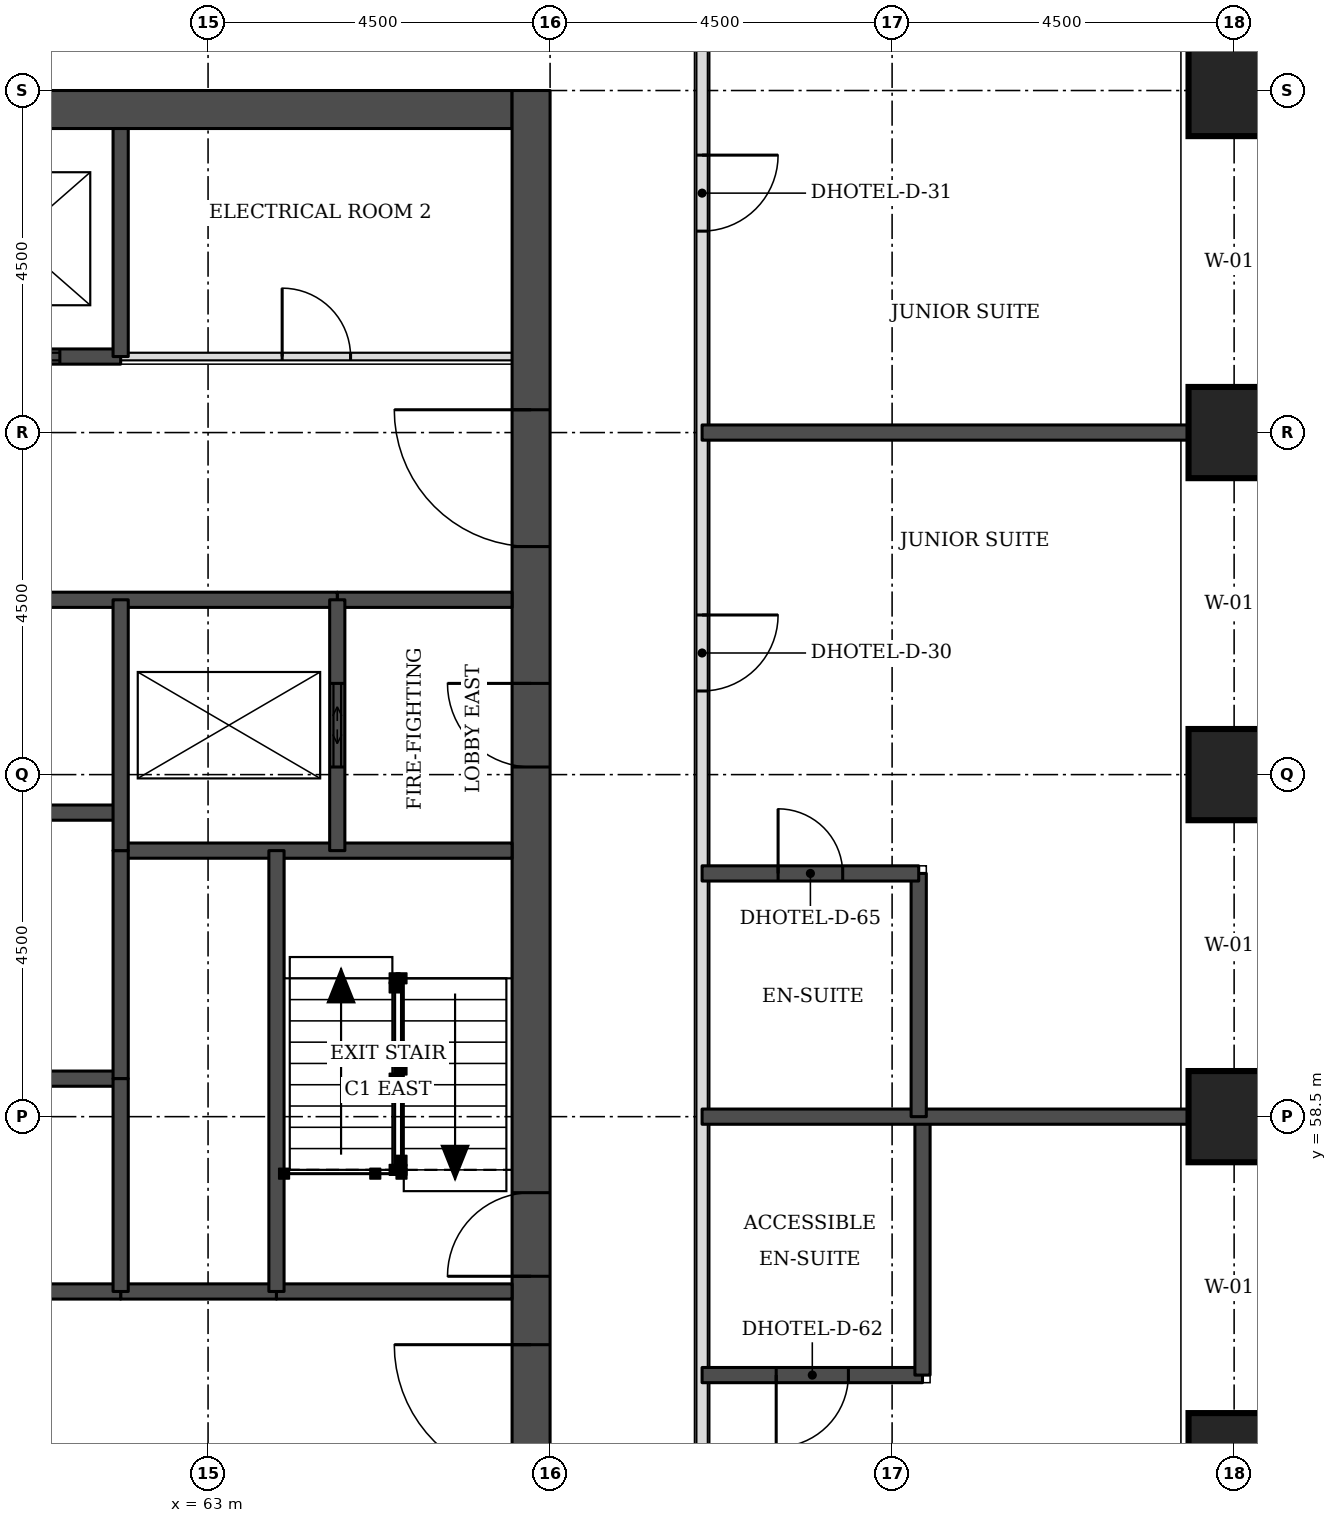
"""IFC4 building model, lengths in metres.
Left out: names, types, materials, properties, quantities, classifications, styles, units other than length and angle.
Written with IfcOpenShell. Run it as: python <this file> out.ifc"""

import sys

from ifc_helpers import new_model, si_unit, direction, frame, frame_2d, origin, origin_2d, place, context, subcontext, project, spatial, rectangle, extrude, element, fill, save


model = new_model("IFC4")
c1 = context("Model", 3, precision=1e-05, world=origin(), true_north=direction((0.0, 1.0)))
c2 = subcontext(c1, "Body", "Model", "MODEL_VIEW")
j1 = project(units=[si_unit("LENGTHUNIT", "METRE"), si_unit("PLANEANGLEUNIT", "RADIAN")], contexts=[c1])
p1 = place(None, origin())
s1 = spatial("IfcSite", under=j1, at=p1, CompositionType="ELEMENT")
p2 = place(p1, origin())
s2 = spatial("IfcBuilding", under=s1, at=p2, CompositionType="ELEMENT")
p3 = place(p2, frame((0.0, 0.0, 59.4)))
s3 = spatial("IfcBuildingStorey", under=s2, at=p3, CompositionType="ELEMENT", Elevation=59.4)
for number, where, z_axis, x_axis in (
    (1, (76.5, 54.0, 0.0), (0.0, 0.0, 1.0), (1.0, 0.0, 0.0)),
    (2, (76.5, 58.5, 0.0), (0.0, 0.0, 1.0), (1.0, 0.0, 0.0)),
    (3, (76.5, 63.0, 0.0), (0.0, 0.0, 1.0), (1.0, 0.0, 0.0)),
    (4, (76.5, 67.5, 0.0), (0.0, 0.0, 1.0), (1.0, 0.0, 0.0)),
    (5, (76.5, 72.0, 0.0), (0.0, 0.0, 1.0), (1.0, 0.0, 0.0)),
):
    element("IfcColumn", number, at=place(p3, frame(where, z_axis=z_axis, x_axis=x_axis)), inside=s3, PredefinedType="COLUMN", context=c2, shape_type="SweptSolid", body=[
        extrude(rectangle(XDim=1.2, YDim=1.2, at=origin_2d()), origin(), (0.0, 0.0, 1.0), 3.3),
    ])
p4 = place(p3, frame((45.5, 71.75, 0.0), z_axis=(0.0, 0.0, 1.0), x_axis=(1.0, 0.0, 0.0)))
e6 = element("IfcWall", 6, at=p4, inside=s3, PredefinedType="SHEAR", context=c2, shape_type="SweptSolid", body=[
    extrude(rectangle(XDim=21.5, YDim=0.5, at=frame_2d((10.75, 0.0))), origin(), (0.0, 0.0, 1.0), 3.3),
])
p5 = place(p3, frame((67.25, 49.5, 0.0), z_axis=(0.0, 0.0, 1.0), x_axis=(0.0, 1.0, 0.0)))
e7 = element("IfcWall", 7, at=p5, inside=s3, PredefinedType="SHEAR", context=c2, shape_type="SweptSolid", body=[
    extrude(rectangle(XDim=22.5, YDim=0.5, at=frame_2d((11.25, 0.0))), origin(), (0.0, 0.0, 1.0), 3.3),
])
p6 = place(p5, frame((4.2, 0.0, 0.0)))
e8 = element("IfcOpeningElement", 8, at=p6, cuts=e7, PredefinedType="OPENING", context=c2, shape_type="SweptSolid", body=[
    extrude(rectangle(XDim=1.8, YDim=2.1, at=frame_2d((0.9, 1.05))), frame((0.0, 0.26, 0.0), z_axis=(0.0, -1.0, 0.0), x_axis=(1.0, 0.0, 0.0)), (0.0, 0.0, 1.0), 0.52),
])
p7 = place(p5, frame((6.9, 0.0, 0.0)))
e9 = element("IfcOpeningElement", 9, at=p7, cuts=e7, PredefinedType="OPENING", context=c2, shape_type="SweptSolid", body=[
    extrude(rectangle(XDim=1.1, YDim=2.1, at=frame_2d((0.55, 1.05))), frame((0.0, 0.26, 0.0), z_axis=(0.0, -1.0, 0.0), x_axis=(1.0, 0.0, 0.0)), (0.0, 0.0, 1.0), 0.52),
])
p8 = place(p5, frame((13.6, 0.0, 0.0)))
e10 = element("IfcOpeningElement", 10, at=p8, cuts=e7, PredefinedType="OPENING", context=c2, shape_type="SweptSolid", body=[
    extrude(rectangle(XDim=1.1, YDim=2.1, at=frame_2d((0.55, 1.05))), frame((0.0, 0.26, 0.0), z_axis=(0.0, -1.0, 0.0), x_axis=(1.0, 0.0, 0.0)), (0.0, 0.0, 1.0), 0.52),
])
p9 = place(p5, frame((16.5, 0.0, 0.0)))
e11 = element("IfcOpeningElement", 11, at=p9, cuts=e7, PredefinedType="OPENING", context=c2, shape_type="SweptSolid", body=[
    extrude(rectangle(XDim=1.8, YDim=2.1, at=frame_2d((0.9, 1.05))), frame((0.0, 0.26, 0.0), z_axis=(0.0, -1.0, 0.0), x_axis=(1.0, 0.0, 0.0)), (0.0, 0.0, 1.0), 0.52),
])
p10 = place(p3, frame((69.5, 47.5, 0.0), z_axis=(0.0, 0.0, 1.0), x_axis=(0.0, 1.0, 0.0)))
e12 = element("IfcWall", 12, at=p10, inside=s3, PredefinedType="PARTITIONING", context=c2, shape_type="SweptSolid", body=[
    extrude(rectangle(XDim=26.5, YDim=0.15, at=frame_2d((13.25, 0.0))), origin(), (0.0, 0.0, 1.0), 3.08),
])
p11 = place(p10, frame((22.65, 0.0, 0.0)))
e13 = element("IfcOpeningElement", 13, at=p11, cuts=e12, PredefinedType="OPENING", context=c2, shape_type="SweptSolid", body=[
    extrude(rectangle(XDim=1.0, YDim=2.1, at=frame_2d((0.5, 1.05))), frame((0.0, 0.085, 0.0), z_axis=(0.0, -1.0, 0.0), x_axis=(1.0, 0.0, 0.0)), (0.0, 0.0, 1.0), 0.17),
])
p12 = place(p10, frame((16.6, 0.0, 0.0)))
e14 = element("IfcOpeningElement", 14, at=p12, cuts=e12, PredefinedType="OPENING", context=c2, shape_type="SweptSolid", body=[
    extrude(rectangle(XDim=1.0, YDim=2.1, at=frame_2d((0.5, 1.05))), frame((0.0, 0.085, 0.0), z_axis=(0.0, -1.0, 0.0), x_axis=(1.0, 0.0, 0.0)), (0.0, 0.0, 1.0), 0.17),
])
p13 = place(p10, frame((4.25, 0.0, 0.0)))
e15 = element("IfcOpeningElement", 15, at=p13, cuts=e12, PredefinedType="OPENING", context=c2, shape_type="SweptSolid", body=[
    extrude(rectangle(XDim=1.1, YDim=2.1, at=frame_2d((0.55, 1.05))), frame((0.0, 0.085, 0.0), z_axis=(0.0, -1.0, 0.0), x_axis=(1.0, 0.0, 0.0)), (0.0, 0.0, 1.0), 0.17),
])
p14 = place(p10, frame((0.55, 0.0, 0.0)))
e16 = element("IfcOpeningElement", 16, at=p14, cuts=e12, PredefinedType="OPENING", context=c2, shape_type="SweptSolid", body=[
    extrude(rectangle(XDim=1.0, YDim=2.1, at=frame_2d((0.5, 1.05))), frame((0.0, 0.085, 0.0), z_axis=(0.0, -1.0, 0.0), x_axis=(1.0, 0.0, 0.0)), (0.0, 0.0, 1.0), 0.17),
])
p15 = place(p3, frame((69.5, 55.1, 0.0), z_axis=(0.0, 0.0, 1.0), x_axis=(1.0, 0.0, 0.0)))
e17 = element("IfcWall", 17, at=p15, inside=s3, PredefinedType="SOLIDWALL", context=c2, shape_type="SweptSolid", body=[
    extrude(rectangle(XDim=2.9, YDim=0.2, at=frame_2d((1.45, 0.0))), origin(), (0.0, 0.0, 1.0), 3.08),
])
p16 = place(p15, frame((0.975, 0.0, 0.0)))
e18 = element("IfcOpeningElement", 18, at=p16, cuts=e17, PredefinedType="OPENING", context=c2, shape_type="SweptSolid", body=[
    extrude(rectangle(XDim=0.95, YDim=2.1, at=frame_2d((0.475, 1.05))), frame((0.0, 0.11, 0.0), z_axis=(0.0, -1.0, 0.0), x_axis=(1.0, 0.0, 0.0)), (0.0, 0.0, 1.0), 0.22),
])
p17 = place(p3, frame((72.4, 55.1, 0.0), z_axis=(0.0, 0.0, 1.0), x_axis=(0.0, 1.0, 0.0)))
e19 = element("IfcWall", 19, at=p17, inside=s3, PredefinedType="SOLIDWALL", context=c2, shape_type="SweptSolid", body=[
    extrude(rectangle(XDim=3.4, YDim=0.2, at=frame_2d((1.7, 0.0))), origin(), (0.0, 0.0, 1.0), 3.08),
])
p18 = place(p3, frame((69.5, 58.5, 0.0), z_axis=(0.0, 0.0, 1.0), x_axis=(1.0, 0.0, 0.0)))
e20 = element("IfcWall", 20, at=p18, inside=s3, PredefinedType="SOLIDWALL", context=c2, shape_type="SweptSolid", body=[
    extrude(rectangle(XDim=6.4, YDim=0.2, at=frame_2d((3.2, 0.0))), origin(), (0.0, 0.0, 1.0), 3.08),
])
p19 = place(p3, frame((72.35, 58.5, 0.0), z_axis=(0.0, 0.0, 1.0), x_axis=(0.0, 1.0, 0.0)))
e21 = element("IfcWall", 21, at=p19, inside=s3, PredefinedType="SOLIDWALL", context=c2, shape_type="SweptSolid", body=[
    extrude(rectangle(XDim=3.2, YDim=0.2, at=frame_2d((1.6, 0.0))), origin(), (0.0, 0.0, 1.0), 3.08),
])
p20 = place(p3, frame((69.5, 61.7, 0.0), z_axis=(0.0, 0.0, 1.0), x_axis=(1.0, 0.0, 0.0)))
e22 = element("IfcWall", 22, at=p20, inside=s3, PredefinedType="SOLIDWALL", context=c2, shape_type="SweptSolid", body=[
    extrude(rectangle(XDim=2.85, YDim=0.2, at=frame_2d((1.425, 0.0))), origin(), (0.0, 0.0, 1.0), 3.08),
])
p21 = place(p20, frame((1.0, 0.0, 0.0)))
e23 = element("IfcOpeningElement", 23, at=p21, cuts=e22, PredefinedType="OPENING", context=c2, shape_type="SweptSolid", body=[
    extrude(rectangle(XDim=0.85, YDim=2.1, at=frame_2d((0.425, 1.05))), frame((0.0, 0.11, 0.0), z_axis=(0.0, -1.0, 0.0), x_axis=(1.0, 0.0, 0.0)), (0.0, 0.0, 1.0), 0.22),
])
p22 = place(p3, frame((69.5, 67.5, 0.0), z_axis=(0.0, 0.0, 1.0), x_axis=(1.0, 0.0, 0.0)))
e24 = element("IfcWall", 24, at=p22, inside=s3, PredefinedType="SOLIDWALL", context=c2, shape_type="SweptSolid", body=[
    extrude(rectangle(XDim=6.4, YDim=0.2, at=frame_2d((3.2, 0.0))), origin(), (0.0, 0.0, 1.0), 3.08),
])
p23 = place(p3, frame((61.85, 56.2, 0.0), z_axis=(0.0, 0.0, 1.0), x_axis=(1.0, 0.0, 0.0)))
e25 = element("IfcWall", 25, at=p23, inside=s3, PredefinedType="SOLIDWALL", context=c2, shape_type="SweptSolid", body=[
    extrude(rectangle(XDim=2.05, YDim=0.2, at=frame_2d((1.025, 0.0))), origin(), (0.0, 0.0, 1.0), 3.08),
])
p24 = place(p3, frame((50.65, 56.2, 0.0), z_axis=(0.0, 0.0, 1.0), x_axis=(1.0, 0.0, 0.0)))
e26 = element("IfcWall", 26, at=p24, inside=s3, PredefinedType="SOLIDWALL", context=c2, shape_type="SweptSolid", body=[
    extrude(rectangle(XDim=11.2, YDim=0.2, at=frame_2d((5.6, 0.0))), origin(), (0.0, 0.0, 1.0), 3.08),
])
p25 = place(p3, frame((63.9, 56.2, 0.0), z_axis=(0.0, 0.0, 1.0), x_axis=(1.0, 0.0, 0.0)))
e27 = element("IfcWall", 27, at=p25, inside=s3, PredefinedType="SOLIDWALL", context=c2, shape_type="SweptSolid", body=[
    extrude(rectangle(XDim=3.1, YDim=0.2, at=frame_2d((1.55, 0.0))), origin(), (0.0, 0.0, 1.0), 3.08),
])
p26 = place(p3, frame((50.65, 59.0, 0.0), z_axis=(0.0, 0.0, 1.0), x_axis=(1.0, 0.0, 0.0)))
e28 = element("IfcWall", 28, at=p26, inside=s3, PredefinedType="SOLIDWALL", context=c2, shape_type="SweptSolid", body=[
    extrude(rectangle(XDim=11.2, YDim=0.2, at=frame_2d((5.6, 0.0))), origin(), (0.0, 0.0, 1.0), 3.3),
])
p27 = place(p3, frame((61.85, 62.0, 0.0), z_axis=(0.0, 0.0, 1.0), x_axis=(1.0, 0.0, 0.0)))
e29 = element("IfcWall", 29, at=p27, inside=s3, PredefinedType="SOLIDWALL", context=c2, shape_type="SweptSolid", body=[
    extrude(rectangle(XDim=5.15, YDim=0.2, at=frame_2d((2.575, 0.0))), origin(), (0.0, 0.0, 1.0), 3.08),
])
p28 = place(p3, frame((50.65, 62.5, 0.0), z_axis=(0.0, 0.0, 1.0), x_axis=(1.0, 0.0, 0.0)))
e30 = element("IfcWall", 30, at=p28, inside=s3, PredefinedType="SOLIDWALL", context=c2, shape_type="SweptSolid", body=[
    extrude(rectangle(XDim=11.2, YDim=0.2, at=frame_2d((5.6, 0.0))), origin(), (0.0, 0.0, 1.0), 3.3),
])
p29 = place(p3, frame((64.7, 65.3, 0.0), z_axis=(0.0, 0.0, 1.0), x_axis=(1.0, 0.0, 0.0)))
e31 = element("IfcWall", 31, at=p29, inside=s3, PredefinedType="SOLIDWALL", context=c2, shape_type="SweptSolid", body=[
    extrude(rectangle(XDim=2.3, YDim=0.2, at=frame_2d((1.15, 0.0))), origin(), (0.0, 0.0, 1.0), 3.08),
])
p30 = place(p3, frame((47.8, 65.3, 0.0), z_axis=(0.0, 0.0, 1.0), x_axis=(1.0, 0.0, 0.0)))
e32 = element("IfcWall", 32, at=p30, inside=s3, PredefinedType="SOLIDWALL", context=c2, shape_type="SweptSolid", body=[
    extrude(rectangle(XDim=16.9, YDim=0.2, at=frame_2d((8.45, 0.0))), origin(), (0.0, 0.0, 1.0), 3.08),
])
p31 = place(p3, frame((61.85, 68.5, 0.0), z_axis=(0.0, 0.0, 1.0), x_axis=(1.0, 0.0, 0.0)))
e33 = element("IfcWall", 33, at=p31, inside=s3, PredefinedType="PARTITIONING", context=c2, shape_type="SweptSolid", body=[
    extrude(rectangle(XDim=5.15, YDim=0.1, at=frame_2d((2.575, 0.0))), origin(), (0.0, 0.0, 1.0), 3.08),
])
p32 = place(p31, frame((2.125, 0.0, 0.0)))
e34 = element("IfcOpeningElement", 34, at=p32, cuts=e33, PredefinedType="OPENING", context=c2, shape_type="SweptSolid", body=[
    extrude(rectangle(XDim=0.9, YDim=2.1, at=frame_2d((0.45, 1.05))), frame((0.0, 0.06, 0.0), z_axis=(0.0, -1.0, 0.0), x_axis=(1.0, 0.0, 0.0)), (0.0, 0.0, 1.0), 0.12),
])
p33 = place(p3, frame((50.65, 68.5, 0.0), z_axis=(0.0, 0.0, 1.0), x_axis=(1.0, 0.0, 0.0)))
e35 = element("IfcWall", 35, at=p33, inside=s3, PredefinedType="SOLIDWALL", context=c2, shape_type="SweptSolid", body=[
    extrude(rectangle(XDim=11.2, YDim=0.2, at=frame_2d((5.6, 0.0))), origin(), (0.0, 0.0, 1.0), 3.08),
])
p34 = place(p33, frame((0.8, 0.0, 0.0)))
e36 = element("IfcOpeningElement", 36, at=p34, cuts=e35, PredefinedType="OPENING", context=c2, shape_type="SweptSolid", body=[
    extrude(rectangle(XDim=1.2, YDim=2.1, at=frame_2d((0.6, 1.05))), frame((0.0, 0.11, 0.0), z_axis=(0.0, -1.0, 0.0), x_axis=(1.0, 0.0, 0.0)), (0.0, 0.0, 1.0), 0.22),
])
p35 = place(p33, frame((3.6, 0.0, 0.0)))
e37 = element("IfcOpeningElement", 37, at=p35, cuts=e35, PredefinedType="OPENING", context=c2, shape_type="SweptSolid", body=[
    extrude(rectangle(XDim=1.2, YDim=2.1, at=frame_2d((0.6, 1.05))), frame((0.0, 0.11, 0.0), z_axis=(0.0, -1.0, 0.0), x_axis=(1.0, 0.0, 0.0)), (0.0, 0.0, 1.0), 0.22),
])
p36 = place(p33, frame((6.4, 0.0, 0.0)))
e38 = element("IfcOpeningElement", 38, at=p36, cuts=e35, PredefinedType="OPENING", context=c2, shape_type="SweptSolid", body=[
    extrude(rectangle(XDim=1.2, YDim=2.1, at=frame_2d((0.6, 1.05))), frame((0.0, 0.11, 0.0), z_axis=(0.0, -1.0, 0.0), x_axis=(1.0, 0.0, 0.0)), (0.0, 0.0, 1.0), 0.22),
])
p37 = place(p33, frame((9.2, 0.0, 0.0)))
e39 = element("IfcOpeningElement", 39, at=p37, cuts=e35, PredefinedType="OPENING", context=c2, shape_type="SweptSolid", body=[
    extrude(rectangle(XDim=1.2, YDim=2.1, at=frame_2d((0.6, 1.05))), frame((0.0, 0.11, 0.0), z_axis=(0.0, -1.0, 0.0), x_axis=(1.0, 0.0, 0.0)), (0.0, 0.0, 1.0), 0.22),
])
p38 = place(p3, frame((61.85, 59.0, 0.0), z_axis=(0.0, 0.0, 1.0), x_axis=(0.0, 1.0, 0.0)))
e40 = element("IfcWall", 40, at=p38, inside=s3, PredefinedType="SOLIDWALL", context=c2, shape_type="SweptSolid", body=[
    extrude(rectangle(XDim=3.0, YDim=0.2, at=frame_2d((1.5, 0.0))), origin(), (0.0, 0.0, 1.0), 3.3),
])
p39 = place(p3, frame((61.85, 56.2, 0.0), z_axis=(0.0, 0.0, 1.0), x_axis=(0.0, 1.0, 0.0)))
e41 = element("IfcWall", 41, at=p39, inside=s3, PredefinedType="SOLIDWALL", context=c2, shape_type="SweptSolid", body=[
    extrude(rectangle(XDim=2.8, YDim=0.2, at=frame_2d((1.4, 0.0))), origin(), (0.0, 0.0, 1.0), 3.08),
])
p40 = place(p3, frame((61.85, 62.0, 0.0), z_axis=(0.0, 0.0, 1.0), x_axis=(0.0, 1.0, 0.0)))
e42 = element("IfcWall", 42, at=p40, inside=s3, PredefinedType="SOLIDWALL", context=c2, shape_type="SweptSolid", body=[
    extrude(rectangle(XDim=3.3, YDim=0.2, at=frame_2d((1.65, 0.0))), origin(), (0.0, 0.0, 1.0), 3.08),
])
p41 = place(p3, frame((61.85, 68.5, 0.0), z_axis=(0.0, 0.0, 1.0), x_axis=(0.0, 1.0, 0.0)))
e43 = element("IfcWall", 43, at=p41, inside=s3, PredefinedType="SOLIDWALL", context=c2, shape_type="SweptSolid", body=[
    extrude(rectangle(XDim=3.0, YDim=0.2, at=frame_2d((1.5, 0.0))), origin(), (0.0, 0.0, 1.0), 3.08),
])
p42 = place(p3, frame((63.9, 56.2, 0.0), z_axis=(0.0, 0.0, 1.0), x_axis=(0.0, 1.0, 0.0)))
e44 = element("IfcWall", 44, at=p42, inside=s3, PredefinedType="SOLIDWALL", context=c2, shape_type="SweptSolid", body=[
    extrude(rectangle(XDim=5.8, YDim=0.2, at=frame_2d((2.9, 0.0))), origin(), (0.0, 0.0, 1.0), 3.08),
])
p43 = place(p3, frame((64.7, 62.0, 0.0), z_axis=(0.0, 0.0, 1.0), x_axis=(0.0, 1.0, 0.0)))
e45 = element("IfcWall", 45, at=p43, inside=s3, PredefinedType="SOLIDWALL", context=c2, shape_type="SweptSolid", body=[
    extrude(rectangle(XDim=3.3, YDim=0.2, at=frame_2d((1.65, 0.0))), origin(), (0.0, 0.0, 1.0), 3.08),
])
p44 = place(p43, frame((1.1, 0.0, 0.0)))
e46 = element("IfcOpeningElement", 46, at=p44, cuts=e45, PredefinedType="OPENING", context=c2, shape_type="SweptSolid", body=[
    extrude(rectangle(XDim=1.1, YDim=2.1, at=frame_2d((0.55, 1.05))), frame((0.0, 0.11, 0.0), z_axis=(0.0, -1.0, 0.0), x_axis=(1.0, 0.0, 0.0)), (0.0, 0.0, 1.0), 0.22),
])
p45 = place(p11, frame((1.0, 0.0, 0.0), z_axis=(0.0, 0.0, 1.0), x_axis=(-1.0, 0.0, 0.0)))
e47 = element("IfcDoor", 47, at=p45, inside=s3, OperationType="SINGLE_SWING_LEFT", PredefinedType="DOOR", context=c2, shape_type="SweptSolid", body=[
    extrude(rectangle(XDim=1.0, YDim=2.1, at=frame_2d((0.5, 1.05))), frame((0.0, 0.025, 0.0), z_axis=(0.0, -1.0, 0.0), x_axis=(1.0, 0.0, 0.0)), (0.0, 0.0, 1.0), 0.05),
])
fill(e13, e47)
p46 = place(p12, frame((1.0, 0.0, 0.0), z_axis=(0.0, 0.0, 1.0), x_axis=(-1.0, 0.0, 0.0)))
e48 = element("IfcDoor", 48, at=p46, inside=s3, OperationType="SINGLE_SWING_LEFT", PredefinedType="DOOR", context=c2, shape_type="SweptSolid", body=[
    extrude(rectangle(XDim=1.0, YDim=2.1, at=frame_2d((0.5, 1.05))), frame((0.0, 0.025, 0.0), z_axis=(0.0, -1.0, 0.0), x_axis=(1.0, 0.0, 0.0)), (0.0, 0.0, 1.0), 0.05),
])
fill(e14, e48)
p47 = place(p21, origin())
e49 = element("IfcDoor", 49, at=p47, inside=s3, OperationType="SINGLE_SWING_LEFT", PredefinedType="DOOR", context=c2, shape_type="SweptSolid", body=[
    extrude(rectangle(XDim=0.85, YDim=2.1, at=frame_2d((0.425, 1.05))), frame((0.0, 0.025, 0.0), z_axis=(0.0, -1.0, 0.0), x_axis=(1.0, 0.0, 0.0)), (0.0, 0.0, 1.0), 0.05),
])
fill(e23, e49)
p48 = place(p16, frame((0.95, 0.0, 0.0), z_axis=(0.0, 0.0, 1.0), x_axis=(-1.0, 0.0, 0.0)))
e50 = element("IfcDoor", 50, at=p48, inside=s3, OperationType="SINGLE_SWING_RIGHT", PredefinedType="DOOR", context=c2, shape_type="SweptSolid", body=[
    extrude(rectangle(XDim=0.95, YDim=2.1, at=frame_2d((0.475, 1.05))), frame((0.0, 0.025, 0.0), z_axis=(0.0, -1.0, 0.0), x_axis=(1.0, 0.0, 0.0)), (0.0, 0.0, 1.0), 0.05),
])
fill(e18, e50)
p49 = place(p37, origin())
e51 = element("IfcDoor", 51, at=p49, inside=s3, OperationType="DOUBLE_DOOR_SLIDING", PredefinedType="DOOR", context=c2, shape_type="SweptSolid", body=[
    extrude(rectangle(XDim=1.2, YDim=2.1, at=frame_2d((0.6, 1.05))), frame((0.0, 0.025, 0.0), z_axis=(0.0, -1.0, 0.0), x_axis=(1.0, 0.0, 0.0)), (0.0, 0.0, 1.0), 0.05),
])
fill(e39, e51)
p50 = place(p44, origin())
e52 = element("IfcDoor", 52, at=p50, inside=s3, OperationType="DOUBLE_DOOR_SLIDING", PredefinedType="DOOR", context=c2, shape_type="SweptSolid", body=[
    extrude(rectangle(XDim=1.1, YDim=2.1, at=frame_2d((0.55, 1.05))), frame((0.0, 0.025, 0.0), z_axis=(0.0, -1.0, 0.0), x_axis=(1.0, 0.0, 0.0)), (0.0, 0.0, 1.0), 0.05),
])
fill(e46, e52)
p51 = place(p6, origin())
e53 = element("IfcDoor", 53, at=p51, inside=s3, OperationType="SINGLE_SWING_RIGHT", PredefinedType="DOOR", context=c2, shape_type="SweptSolid", body=[
    extrude(rectangle(XDim=1.8, YDim=2.1, at=frame_2d((0.9, 1.05))), frame((0.0, 0.025, 0.0), z_axis=(0.0, -1.0, 0.0), x_axis=(1.0, 0.0, 0.0)), (0.0, 0.0, 1.0), 0.05),
])
fill(e8, e53)
p52 = place(p7, origin())
e54 = element("IfcDoor", 54, at=p52, inside=s3, OperationType="SINGLE_SWING_LEFT", PredefinedType="DOOR", context=c2, shape_type="SweptSolid", body=[
    extrude(rectangle(XDim=1.1, YDim=2.1, at=frame_2d((0.55, 1.05))), frame((0.0, 0.025, 0.0), z_axis=(0.0, -1.0, 0.0), x_axis=(1.0, 0.0, 0.0)), (0.0, 0.0, 1.0), 0.05),
])
fill(e9, e54)
p53 = place(p8, origin())
e55 = element("IfcDoor", 55, at=p53, inside=s3, OperationType="SINGLE_SWING_RIGHT", PredefinedType="DOOR", context=c2, shape_type="SweptSolid", body=[
    extrude(rectangle(XDim=1.1, YDim=2.1, at=frame_2d((0.55, 1.05))), frame((0.0, 0.025, 0.0), z_axis=(0.0, -1.0, 0.0), x_axis=(1.0, 0.0, 0.0)), (0.0, 0.0, 1.0), 0.05),
])
fill(e10, e55)
p54 = place(p9, origin())
e56 = element("IfcDoor", 56, at=p54, inside=s3, OperationType="SINGLE_SWING_RIGHT", PredefinedType="DOOR", context=c2, shape_type="SweptSolid", body=[
    extrude(rectangle(XDim=1.8, YDim=2.1, at=frame_2d((0.9, 1.05))), frame((0.0, 0.025, 0.0), z_axis=(0.0, -1.0, 0.0), x_axis=(1.0, 0.0, 0.0)), (0.0, 0.0, 1.0), 0.05),
])
fill(e11, e56)
p55 = place(p32, origin())
e57 = element("IfcDoor", 57, at=p55, inside=s3, OperationType="SINGLE_SWING_LEFT", PredefinedType="DOOR", context=c2, shape_type="SweptSolid", body=[
    extrude(rectangle(XDim=0.9, YDim=2.1, at=frame_2d((0.45, 1.05))), frame((0.0, 0.025, 0.0), z_axis=(0.0, -1.0, 0.0), x_axis=(1.0, 0.0, 0.0)), (0.0, 0.0, 1.0), 0.05),
])
fill(e34, e57)
save(model, sys.argv[1])
